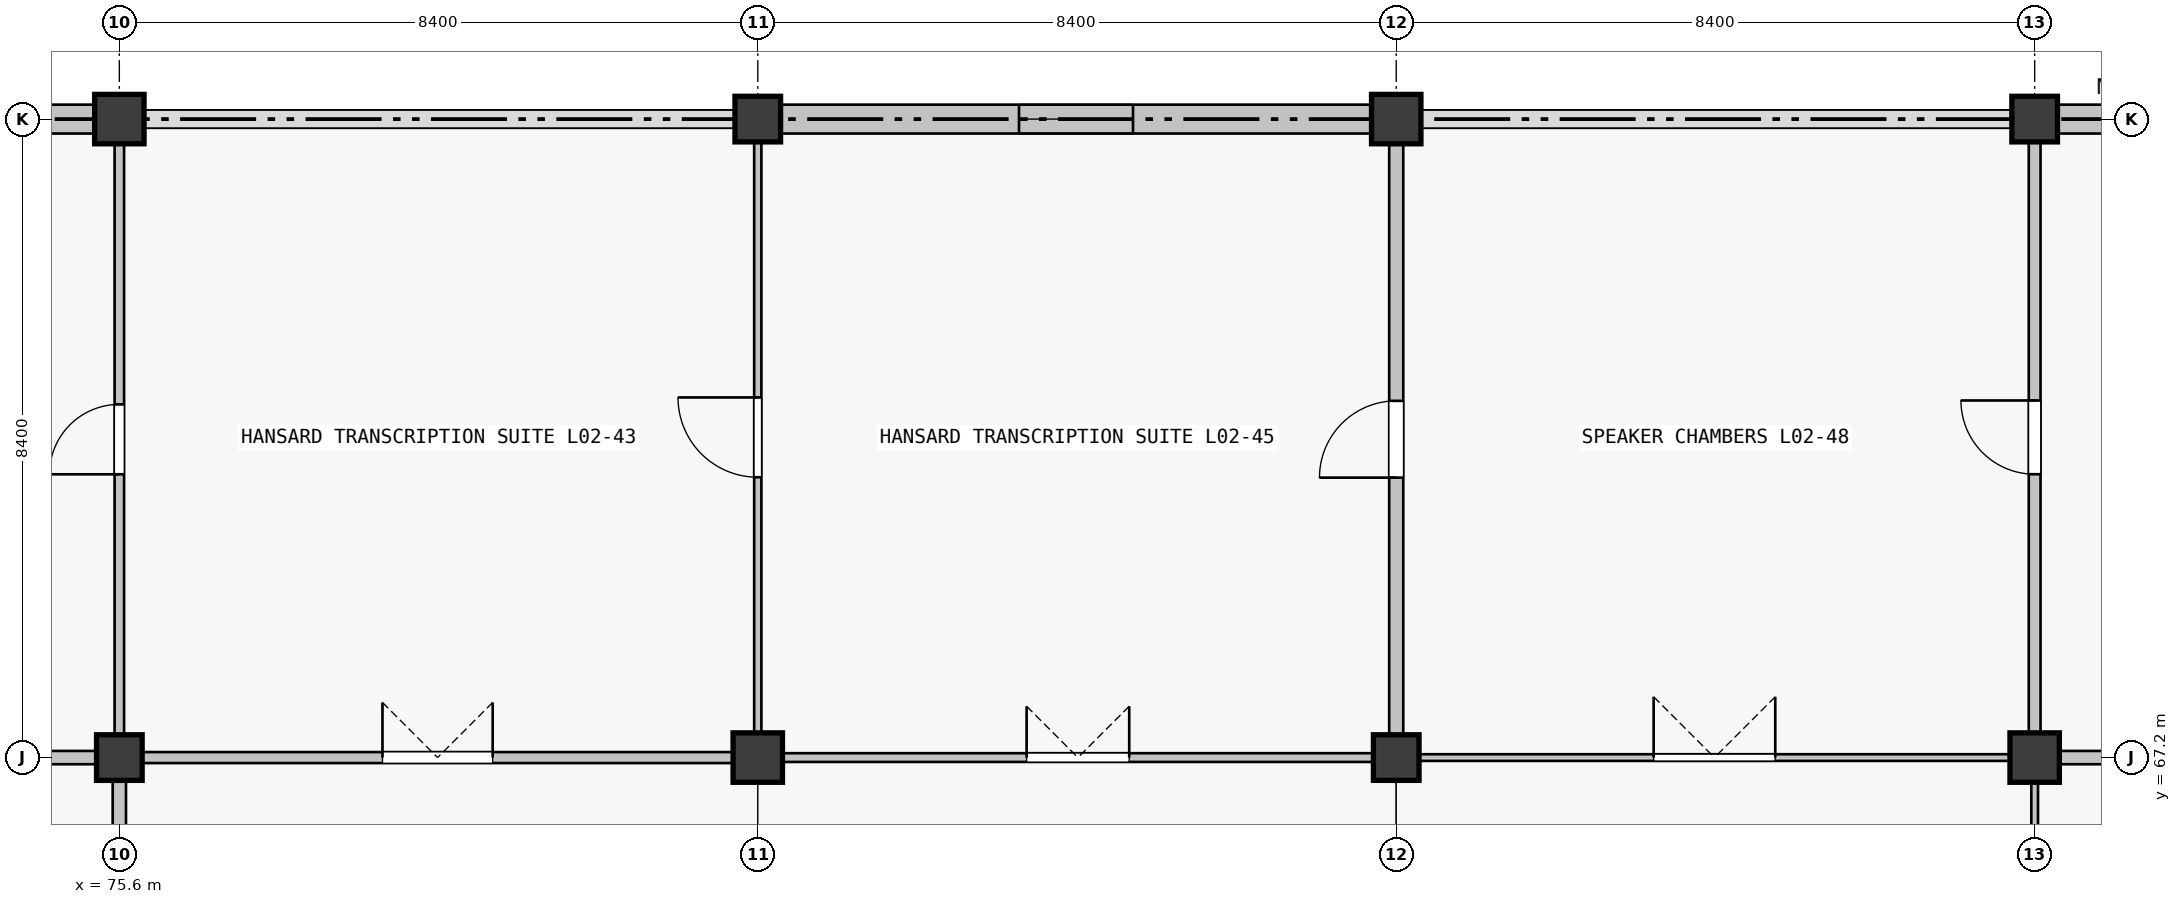
"""IFC4 building model, lengths in metres.
Left out: names, types, materials, properties, quantities, classifications, styles, units other than length and angle.
Written with IfcOpenShell. Run it as: python <this file> out.ifc"""

import sys

from ifc_helpers import new_model, si_unit, direction, frame, frame_2d, origin, origin_2d, place, context, subcontext, project, spatial, rectangle, extrude, element, fill, save


model = new_model("IFC4")
c1 = context("Model", 3, precision=1e-05, world=origin(), true_north=direction((0.0, 1.0)))
c2 = subcontext(c1, "Body", "Model", "MODEL_VIEW")
j1 = project(units=[si_unit("LENGTHUNIT", "METRE"), si_unit("PLANEANGLEUNIT", "RADIAN")], contexts=[c1])
p1 = place(None, origin())
s1 = spatial("IfcSite", under=j1, at=p1, CompositionType="ELEMENT")
p2 = place(p1, origin())
s2 = spatial("IfcBuilding", under=s1, at=p2, CompositionType="ELEMENT")
p3 = place(p2, frame((0.0, 0.0, 10.26)))
s3 = spatial("IfcBuildingStorey", under=s2, at=p3, CompositionType="ELEMENT", Elevation=10.26)
p4 = place(p3, frame((75.6, 67.2, 0.0), z_axis=(0.0, 0.0, 1.0), x_axis=(1.0, 0.0, 0.0)))
e1 = element("IfcColumn", 1, at=p4, inside=s3, PredefinedType="COLUMN", context=c2, shape_type="SweptSolid", body=[
    extrude(rectangle(XDim=0.6, YDim=0.6, at=origin_2d()), origin(), (0.0, 0.0, 1.0), 4.5),
])
for number, where, z_axis, x_axis in (
    (2, (75.6, 75.6, 0.0), (0.0, 0.0, 1.0), (1.0, 0.0, 0.0)),
    (3, (84.0, 67.2, 0.0), (0.0, 0.0, 1.0), (1.0, 0.0, 0.0)),
):
    element("IfcColumn", number, at=place(p3, frame(where, z_axis=z_axis, x_axis=x_axis)), inside=s3, PredefinedType="COLUMN", context=c2, shape_type="SweptSolid", body=[
        extrude(rectangle(XDim=0.65, YDim=0.65, at=origin_2d()), origin(), (0.0, 0.0, 1.0), 4.5),
    ])
for number, where, z_axis, x_axis in (
    (4, (84.0, 75.6, 0.0), (0.0, 0.0, 1.0), (1.0, 0.0, 0.0)),
    (5, (92.4, 67.2, 0.0), (0.0, 0.0, 1.0), (1.0, 0.0, 0.0)),
):
    element("IfcColumn", number, at=place(p3, frame(where, z_axis=z_axis, x_axis=x_axis)), inside=s3, PredefinedType="COLUMN", context=c2, shape_type="SweptSolid", body=[
        extrude(rectangle(XDim=0.6, YDim=0.6, at=origin_2d()), origin(), (0.0, 0.0, 1.0), 4.5),
    ])
for number, where, z_axis, x_axis in (
    (6, (92.4, 75.6, 0.0), (0.0, 0.0, 1.0), (1.0, 0.0, 0.0)),
    (7, (100.8, 67.2, 0.0), (0.0, 0.0, 1.0), (1.0, 0.0, 0.0)),
):
    element("IfcColumn", number, at=place(p3, frame(where, z_axis=z_axis, x_axis=x_axis)), inside=s3, PredefinedType="COLUMN", context=c2, shape_type="SweptSolid", body=[
        extrude(rectangle(XDim=0.65, YDim=0.65, at=origin_2d()), origin(), (0.0, 0.0, 1.0), 4.5),
    ])
p5 = place(p3, frame((100.8, 75.6, 0.0), z_axis=(0.0, 0.0, 1.0), x_axis=(1.0, 0.0, 0.0)))
e8 = element("IfcColumn", 8, at=p5, inside=s3, PredefinedType="COLUMN", context=c2, shape_type="SweptSolid", body=[
    extrude(rectangle(XDim=0.6, YDim=0.6, at=origin_2d()), origin(), (0.0, 0.0, 1.0), 4.5),
])
p6 = place(p3, frame((67.501, 75.6, 0.0), z_axis=(0.0, 0.0, 1.0), x_axis=(1.0, 0.0, 0.0)))
e9 = element("IfcWall", 9, at=p6, inside=s3, PredefinedType="SOLIDWALL", context=c2, shape_type="SweptSolid", body=[
    extrude(rectangle(XDim=7.773, YDim=0.38, at=frame_2d((3.886, 0.0))), origin(), (0.0, 0.0, 1.0), 3.54),
])
p7 = place(p3, frame((84.301, 75.6, 0.0), z_axis=(0.0, 0.0, 1.0), x_axis=(1.0, 0.0, 0.0)))
e10 = element("IfcWall", 10, at=p7, inside=s3, PredefinedType="SOLIDWALL", context=c2, shape_type="SweptSolid", body=[
    extrude(rectangle(XDim=7.773, YDim=0.38, at=frame_2d((3.886, 0.0))), origin(), (0.0, 0.0, 1.0), 3.54),
])
p8 = place(p7, frame((3.136, 0.0, 1.55)))
e11 = element("IfcOpeningElement", 11, at=p8, cuts=e10, PredefinedType="OPENING", context=c2, shape_type="SweptSolid", body=[
    extrude(rectangle(XDim=1.5, YDim=1.2, at=frame_2d((0.75, 0.6))), frame((0.0, 0.19, 0.0), z_axis=(0.0, -1.0, 0.0), x_axis=(1.0, 0.0, 0.0)), (0.0, 0.0, 1.0), 0.38),
])
p9 = place(p3, frame((101.101, 75.6, 0.0), z_axis=(0.0, 0.0, 1.0), x_axis=(1.0, 0.0, 0.0)))
e12 = element("IfcWall", 12, at=p9, inside=s3, PredefinedType="SOLIDWALL", context=c2, shape_type="SweptSolid", body=[
    extrude(rectangle(XDim=7.773, YDim=0.38, at=frame_2d((3.886, 0.0))), origin(), (0.0, 0.0, 1.0), 3.54),
])
p10 = place(p3, frame((67.527, 67.2, 0.0), z_axis=(0.0, 0.0, 1.0), x_axis=(1.0, 0.0, 0.0)))
e13 = element("IfcWall", 13, at=p10, inside=s3, PredefinedType="PARTITIONING", context=c2, shape_type="SweptSolid", body=[
    extrude(rectangle(XDim=7.771, YDim=0.175, at=frame_2d((3.885, 0.0))), origin(), (0.0, 0.0, 1.0), 3.37),
])
p11 = place(p10, frame((3.085, 0.0, 0.0)))
e14 = element("IfcOpeningElement", 14, at=p11, cuts=e13, PredefinedType="OPENING", context=c2, shape_type="SweptSolid", body=[
    extrude(rectangle(XDim=1.6, YDim=2.3, at=frame_2d((0.8, 1.15))), frame((0.0, 0.087, 0.0), z_axis=(0.0, -1.0, 0.0), x_axis=(1.0, 0.0, 0.0)), (0.0, 0.0, 1.0), 0.175),
])
p12 = place(p3, frame((75.902, 67.2, 0.0), z_axis=(0.0, 0.0, 1.0), x_axis=(1.0, 0.0, 0.0)))
e15 = element("IfcWall", 15, at=p12, inside=s3, PredefinedType="PARTITIONING", context=c2, shape_type="SweptSolid", body=[
    extrude(rectangle(XDim=7.771, YDim=0.145, at=frame_2d((3.885, 0.0))), origin(), (0.0, 0.0, 1.0), 3.37),
])
p13 = place(p12, frame((3.16, 0.0, 0.0)))
e16 = element("IfcOpeningElement", 16, at=p13, cuts=e15, PredefinedType="OPENING", context=c2, shape_type="SweptSolid", body=[
    extrude(rectangle(XDim=1.45, YDim=2.2, at=frame_2d((0.725, 1.1))), frame((0.0, 0.073, 0.0), z_axis=(0.0, -1.0, 0.0), x_axis=(1.0, 0.0, 0.0)), (0.0, 0.0, 1.0), 0.145),
])
p14 = place(p3, frame((84.327, 67.2, 0.0), z_axis=(0.0, 0.0, 1.0), x_axis=(1.0, 0.0, 0.0)))
e17 = element("IfcWall", 17, at=p14, inside=s3, PredefinedType="PARTITIONING", context=c2, shape_type="SweptSolid", body=[
    extrude(rectangle(XDim=7.771, YDim=0.115, at=frame_2d((3.885, 0.0))), origin(), (0.0, 0.0, 1.0), 3.37),
])
p15 = place(p14, frame((3.21, 0.0, 0.0)))
e18 = element("IfcOpeningElement", 18, at=p15, cuts=e17, PredefinedType="OPENING", context=c2, shape_type="SweptSolid", body=[
    extrude(rectangle(XDim=1.35, YDim=2.2, at=frame_2d((0.675, 1.1))), frame((0.0, 0.058, 0.0), z_axis=(0.0, -1.0, 0.0), x_axis=(1.0, 0.0, 0.0)), (0.0, 0.0, 1.0), 0.115),
])
p16 = place(p3, frame((92.702, 67.2, 0.0), z_axis=(0.0, 0.0, 1.0), x_axis=(1.0, 0.0, 0.0)))
e19 = element("IfcWall", 19, at=p16, inside=s3, PredefinedType="PARTITIONING", context=c2, shape_type="SweptSolid", body=[
    extrude(rectangle(XDim=7.771, YDim=0.088, at=frame_2d((3.885, 0.0))), origin(), (0.0, 0.0, 1.0), 3.37),
])
p17 = place(p16, frame((3.085, 0.0, 0.0)))
e20 = element("IfcOpeningElement", 20, at=p17, cuts=e19, PredefinedType="OPENING", context=c2, shape_type="SweptSolid", body=[
    extrude(rectangle(XDim=1.6, YDim=2.3, at=frame_2d((0.8, 1.15))), frame((0.0, 0.044, 0.0), z_axis=(0.0, -1.0, 0.0), x_axis=(1.0, 0.0, 0.0)), (0.0, 0.0, 1.0), 0.088),
])
p18 = place(p3, frame((101.127, 67.2, 0.0), z_axis=(0.0, 0.0, 1.0), x_axis=(1.0, 0.0, 0.0)))
e21 = element("IfcWall", 21, at=p18, inside=s3, PredefinedType="PARTITIONING", context=c2, shape_type="SweptSolid", body=[
    extrude(rectangle(XDim=7.771, YDim=0.175, at=frame_2d((3.885, 0.0))), origin(), (0.0, 0.0, 1.0), 3.37),
])
p19 = place(p18, frame((3.186, 0.0, 0.0)))
e22 = element("IfcOpeningElement", 22, at=p19, cuts=e21, PredefinedType="OPENING", context=c2, shape_type="SweptSolid", body=[
    extrude(rectangle(XDim=1.4, YDim=2.25, at=frame_2d((0.7, 1.125))), frame((0.0, 0.087, 0.0), z_axis=(0.0, -1.0, 0.0), x_axis=(1.0, 0.0, 0.0)), (0.0, 0.0, 1.0), 0.175),
])
p20 = place(p3, frame((75.6, 59.127, 0.0), z_axis=(0.0, 0.0, 1.0), x_axis=(0.0, 1.0, 0.0)))
e23 = element("IfcWall", 23, at=p20, inside=s3, PredefinedType="PARTITIONING", context=c2, shape_type="SweptSolid", body=[
    extrude(rectangle(XDim=7.771, YDim=0.175, at=frame_2d((3.885, 0.0))), origin(), (0.0, 0.0, 1.0), 3.37),
])
p21 = place(p20, frame((2.986, 0.0, 0.0)))
e24 = element("IfcOpeningElement", 24, at=p21, cuts=e23, PredefinedType="OPENING", context=c2, shape_type="SweptSolid", body=[
    extrude(rectangle(XDim=1.8, YDim=2.4, at=frame_2d((0.9, 1.2))), frame((0.0, 0.087, 0.0), z_axis=(0.0, -1.0, 0.0), x_axis=(1.0, 0.0, 0.0)), (0.0, 0.0, 1.0), 0.175),
])
p22 = place(p3, frame((75.6, 67.502, 0.0), z_axis=(0.0, 0.0, 1.0), x_axis=(0.0, 1.0, 0.0)))
e25 = element("IfcWall", 25, at=p22, inside=s3, PredefinedType="PARTITIONING", context=c2, shape_type="SweptSolid", body=[
    extrude(rectangle(XDim=7.771, YDim=0.125, at=frame_2d((3.885, 0.0))), origin(), (0.0, 0.0, 1.0), 3.37),
])
p23 = place(p22, frame((3.425, 0.0, 0.0)))
e26 = element("IfcOpeningElement", 26, at=p23, cuts=e25, PredefinedType="OPENING", context=c2, shape_type="SweptSolid", body=[
    extrude(rectangle(XDim=0.92, YDim=2.15, at=frame_2d((0.46, 1.075))), frame((0.0, 0.062, 0.0), z_axis=(0.0, -1.0, 0.0), x_axis=(1.0, 0.0, 0.0)), (0.0, 0.0, 1.0), 0.125),
])
p24 = place(p3, frame((84.0, 67.527, 0.0), z_axis=(0.0, 0.0, 1.0), x_axis=(0.0, 1.0, 0.0)))
e27 = element("IfcWall", 27, at=p24, inside=s3, PredefinedType="PARTITIONING", context=c2, shape_type="SweptSolid", body=[
    extrude(rectangle(XDim=7.771, YDim=0.095, at=frame_2d((3.885, 0.0))), origin(), (0.0, 0.0, 1.0), 3.37),
])
p25 = place(p24, frame((3.361, 0.0, 0.0)))
e28 = element("IfcOpeningElement", 28, at=p25, cuts=e27, PredefinedType="OPENING", context=c2, shape_type="SweptSolid", body=[
    extrude(rectangle(XDim=1.05, YDim=2.12, at=frame_2d((0.525, 1.06))), frame((0.0, 0.047, 0.0), z_axis=(0.0, -1.0, 0.0), x_axis=(1.0, 0.0, 0.0)), (0.0, 0.0, 1.0), 0.095),
])
p26 = place(p3, frame((92.4, 67.502, 0.0), z_axis=(0.0, 0.0, 1.0), x_axis=(0.0, 1.0, 0.0)))
e29 = element("IfcWall", 29, at=p26, inside=s3, PredefinedType="PARTITIONING", context=c2, shape_type="SweptSolid", body=[
    extrude(rectangle(XDim=7.771, YDim=0.185, at=frame_2d((3.885, 0.0))), origin(), (0.0, 0.0, 1.0), 3.37),
])
p27 = place(p26, frame((3.381, 0.0, 0.0)))
e30 = element("IfcOpeningElement", 30, at=p27, cuts=e29, PredefinedType="OPENING", context=c2, shape_type="SweptSolid", body=[
    extrude(rectangle(XDim=1.01, YDim=2.12, at=frame_2d((0.505, 1.06))), frame((0.0, 0.093, 0.0), z_axis=(0.0, -1.0, 0.0), x_axis=(1.0, 0.0, 0.0)), (0.0, 0.0, 1.0), 0.185),
])
p28 = place(p3, frame((100.8, 59.102, 0.0), z_axis=(0.0, 0.0, 1.0), x_axis=(0.0, 1.0, 0.0)))
e31 = element("IfcWall", 31, at=p28, inside=s3, PredefinedType="PARTITIONING", context=c2, shape_type="SweptSolid", body=[
    extrude(rectangle(XDim=7.771, YDim=0.088, at=frame_2d((3.885, 0.0))), origin(), (0.0, 0.0, 1.0), 3.37),
])
p29 = place(p28, frame((3.085, 0.0, 0.0)))
e32 = element("IfcOpeningElement", 32, at=p29, cuts=e31, PredefinedType="OPENING", context=c2, shape_type="SweptSolid", body=[
    extrude(rectangle(XDim=1.6, YDim=2.3, at=frame_2d((0.8, 1.15))), frame((0.0, 0.044, 0.0), z_axis=(0.0, -1.0, 0.0), x_axis=(1.0, 0.0, 0.0)), (0.0, 0.0, 1.0), 0.088),
])
p30 = place(p3, frame((100.8, 67.527, 0.0), z_axis=(0.0, 0.0, 1.0), x_axis=(0.0, 1.0, 0.0)))
e33 = element("IfcWall", 33, at=p30, inside=s3, PredefinedType="PARTITIONING", context=c2, shape_type="SweptSolid", body=[
    extrude(rectangle(XDim=7.771, YDim=0.155, at=frame_2d((3.885, 0.0))), origin(), (0.0, 0.0, 1.0), 3.37),
])
p31 = place(p30, frame((3.401, 0.0, 0.0)))
e34 = element("IfcOpeningElement", 34, at=p31, cuts=e33, PredefinedType="OPENING", context=c2, shape_type="SweptSolid", body=[
    extrude(rectangle(XDim=0.97, YDim=2.12, at=frame_2d((0.485, 1.06))), frame((0.0, 0.078, 0.0), z_axis=(0.0, -1.0, 0.0), x_axis=(1.0, 0.0, 0.0)), (0.0, 0.0, 1.0), 0.155),
])
p32 = place(p8, origin())
e35 = element("IfcWindow", 35, at=p32, inside=s3, PartitioningType="SINGLE_PANEL", PredefinedType="WINDOW", context=c2, shape_type="SweptSolid", body=[
    extrude(rectangle(XDim=1.5, YDim=1.2, at=frame_2d((0.75, 0.6))), frame((0.0, 0.03, 0.0), z_axis=(0.0, -1.0, 0.0), x_axis=(1.0, 0.0, 0.0)), (0.0, 0.0, 1.0), 0.06),
])
fill(e11, e35)
p33 = place(p13, origin())
e36 = element("IfcDoor", 36, at=p33, inside=s3, OperationType="DOUBLE_DOOR_SINGLE_SWING", PredefinedType="DOOR", context=c2, shape_type="SweptSolid", body=[
    extrude(rectangle(XDim=1.45, YDim=2.2, at=frame_2d((0.725, 1.1))), frame((0.0, 0.025, 0.0), z_axis=(0.0, -1.0, 0.0), x_axis=(1.0, 0.0, 0.0)), (0.0, 0.0, 1.0), 0.05),
])
fill(e16, e36)
p34 = place(p15, origin())
e37 = element("IfcDoor", 37, at=p34, inside=s3, OperationType="DOUBLE_DOOR_SINGLE_SWING", PredefinedType="DOOR", context=c2, shape_type="SweptSolid", body=[
    extrude(rectangle(XDim=1.35, YDim=2.2, at=frame_2d((0.675, 1.1))), frame((0.0, 0.025, 0.0), z_axis=(0.0, -1.0, 0.0), x_axis=(1.0, 0.0, 0.0)), (0.0, 0.0, 1.0), 0.05),
])
fill(e18, e37)
p35 = place(p17, origin())
e38 = element("IfcDoor", 38, at=p35, inside=s3, OperationType="DOUBLE_DOOR_SINGLE_SWING", PredefinedType="DOOR", context=c2, shape_type="SweptSolid", body=[
    extrude(rectangle(XDim=1.6, YDim=2.3, at=frame_2d((0.8, 1.15))), frame((0.0, 0.025, 0.0), z_axis=(0.0, -1.0, 0.0), x_axis=(1.0, 0.0, 0.0)), (0.0, 0.0, 1.0), 0.05),
])
fill(e20, e38)
p36 = place(p23, origin())
e39 = element("IfcDoor", 39, at=p36, inside=s3, OperationType="SINGLE_SWING_LEFT", PredefinedType="DOOR", context=c2, shape_type="SweptSolid", body=[
    extrude(rectangle(XDim=0.92, YDim=2.15, at=frame_2d((0.46, 1.075))), frame((0.0, 0.025, 0.0), z_axis=(0.0, -1.0, 0.0), x_axis=(1.0, 0.0, 0.0)), (0.0, 0.0, 1.0), 0.05),
])
fill(e26, e39)
p37 = place(p25, origin())
e40 = element("IfcDoor", 40, at=p37, inside=s3, OperationType="SINGLE_SWING_RIGHT", PredefinedType="DOOR", context=c2, shape_type="SweptSolid", body=[
    extrude(rectangle(XDim=1.05, YDim=2.12, at=frame_2d((0.525, 1.06))), frame((0.0, 0.025, 0.0), z_axis=(0.0, -1.0, 0.0), x_axis=(1.0, 0.0, 0.0)), (0.0, 0.0, 1.0), 0.05),
])
fill(e28, e40)
p38 = place(p27, origin())
e41 = element("IfcDoor", 41, at=p38, inside=s3, OperationType="SINGLE_SWING_LEFT", PredefinedType="DOOR", context=c2, shape_type="SweptSolid", body=[
    extrude(rectangle(XDim=1.01, YDim=2.12, at=frame_2d((0.505, 1.06))), frame((0.0, 0.025, 0.0), z_axis=(0.0, -1.0, 0.0), x_axis=(1.0, 0.0, 0.0)), (0.0, 0.0, 1.0), 0.05),
])
fill(e30, e41)
p39 = place(p31, origin())
e42 = element("IfcDoor", 42, at=p39, inside=s3, OperationType="SINGLE_SWING_RIGHT", PredefinedType="DOOR", context=c2, shape_type="SweptSolid", body=[
    extrude(rectangle(XDim=0.97, YDim=2.12, at=frame_2d((0.485, 1.06))), frame((0.0, 0.025, 0.0), z_axis=(0.0, -1.0, 0.0), x_axis=(1.0, 0.0, 0.0)), (0.0, 0.0, 1.0), 0.05),
])
fill(e34, e42)
save(model, sys.argv[1])
